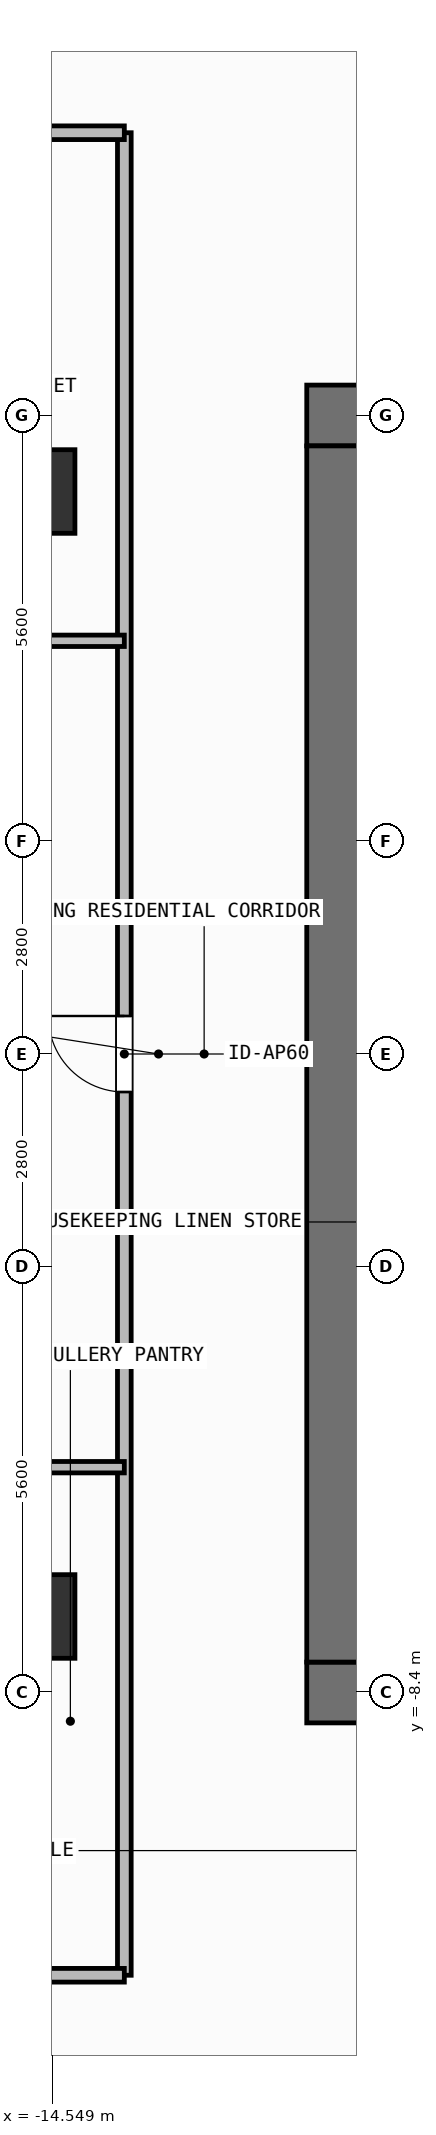
"""IFC4 building model, lengths in metres.
Left out: names, types, materials, properties, quantities, classifications, styles, units other than length and angle.
Written with IfcOpenShell. Run it as: python <this file> out.ifc"""

import sys

from ifc_helpers import new_model, si_unit, direction, frame, frame_2d, origin, origin_2d, place, context, subcontext, project, spatial, rectangle, extrude, element, fill, save


model = new_model("IFC4")
c1 = context("Model", 3, precision=1e-05, world=origin(), true_north=direction((0.0, 1.0)))
c2 = subcontext(c1, "Body", "Model", "MODEL_VIEW")
j1 = project(units=[si_unit("LENGTHUNIT", "METRE"), si_unit("PLANEANGLEUNIT", "RADIAN")], contexts=[c1])
p1 = place(None, origin())
s1 = spatial("IfcSite", under=j1, at=p1, CompositionType="ELEMENT")
p2 = place(p1, origin())
s2 = spatial("IfcBuilding", under=s1, at=p2, CompositionType="ELEMENT")
p3 = place(p2, frame((0.0, 0.0, 168.0)))
s3 = spatial("IfcBuildingStorey", under=s2, at=p3, CompositionType="ELEMENT", Elevation=168.0)
for number, where, z_axis, x_axis in (
    (1, (-11.2, -8.4, 0.0), (0.0, 0.0, 1.0), (1.0, 0.0, 0.0)),
    (2, (-11.2, 8.4, 0.0), (0.0, 0.0, 1.0), (1.0, 0.0, 0.0)),
):
    element("IfcWall", number, at=place(p3, frame(where, z_axis=z_axis, x_axis=x_axis)), inside=s3, PredefinedType="SHEAR", context=c2, shape_type="SweptSolid", body=[
        extrude(rectangle(XDim=1.5, YDim=0.8, at=frame_2d((0.75, 0.0))), origin(), (0.0, 0.0, 1.0), 3.9),
    ])
p4 = place(p3, frame((-10.8, -8.0, 0.0), z_axis=(0.0, 0.0, 1.0), x_axis=(0.0, 1.0, 0.0)))
e3 = element("IfcWall", 3, at=p4, inside=s3, PredefinedType="SHEAR", context=c2, shape_type="SweptSolid", body=[
    extrude(rectangle(XDim=16.0, YDim=0.8, at=frame_2d((8.0, 0.0))), origin(), (0.0, 0.0, 1.0), 3.9),
])
for number, where, z_axis, x_axis in (
    (4, (-14.8, -7.4, 0.0), (0.0, 0.0, 1.0), (1.0, 0.0, 0.0)),
    (5, (-14.8, 7.4, 0.0), (0.0, 0.0, 1.0), (1.0, 0.0, 0.0)),
):
    element("IfcColumn", number, at=place(p3, frame(where, z_axis=z_axis, x_axis=x_axis)), inside=s3, PredefinedType="COLUMN", context=c2, shape_type="SweptSolid", body=[
        extrude(rectangle(XDim=1.1, YDim=1.1, at=origin_2d()), origin(), (0.0, 0.0, 1.0), 3.9),
    ])
p5 = place(p3, frame((-13.6, -12.12, 0.0), z_axis=(0.0, 0.0, 1.0), x_axis=(0.0, 1.0, 0.0)))
e6 = element("IfcWall", 6, at=p5, inside=s3, PredefinedType="PARTITIONING", context=c2, shape_type="SweptSolid", body=[
    extrude(rectangle(XDim=24.24, YDim=0.18, at=frame_2d((12.12, 0.0))), origin(), (0.0, 0.0, 1.0), 3.68),
])
p6 = place(p5, frame((11.62, 0.0, 0.0)))
e7 = element("IfcOpeningElement", 7, at=p6, cuts=e6, PredefinedType="OPENING", context=c2, shape_type="SweptSolid", body=[
    extrude(rectangle(XDim=1.0, YDim=2.2, at=frame_2d((0.5, 1.1))), frame((0.0, 0.1, 0.0), z_axis=(0.0, -1.0, 0.0), x_axis=(1.0, 0.0, 0.0)), (0.0, 0.0, 1.0), 0.2),
])
p7 = place(p3, frame((-18.223, 5.436, 0.0), z_axis=(0.0, 0.0, 1.0), x_axis=(1.0, 0.0, 0.0)))
e8 = element("IfcWall", 8, at=p7, inside=s3, PredefinedType="PARTITIONING", context=c2, shape_type="SweptSolid", body=[
    extrude(rectangle(XDim=4.623, YDim=0.15, at=frame_2d((2.312, 0.0))), origin(), (0.0, 0.0, 1.0), 3.68),
])
p8 = place(p7, frame((1.886, 0.0, 0.0)))
e9 = element("IfcOpeningElement", 9, at=p8, cuts=e8, PredefinedType="OPENING", context=c2, shape_type="SweptSolid", body=[
    extrude(rectangle(XDim=0.85, YDim=2.1, at=frame_2d((0.425, 1.05))), frame((0.0, 0.085, 0.0), z_axis=(0.0, -1.0, 0.0), x_axis=(1.0, 0.0, 0.0)), (0.0, 0.0, 1.0), 0.17),
])
p9 = place(p3, frame((-21.29, -5.436, 0.0), z_axis=(0.0, 0.0, 1.0), x_axis=(1.0, 0.0, 0.0)))
e10 = element("IfcWall", 10, at=p9, inside=s3, PredefinedType="PARTITIONING", context=c2, shape_type="SweptSolid", body=[
    extrude(rectangle(XDim=7.69, YDim=0.15, at=frame_2d((3.845, 0.0))), origin(), (0.0, 0.0, 1.0), 3.68),
])
p10 = place(p9, frame((3.332, 0.0, 0.0)))
e11 = element("IfcOpeningElement", 11, at=p10, cuts=e10, PredefinedType="OPENING", context=c2, shape_type="SweptSolid", body=[
    extrude(rectangle(XDim=0.85, YDim=2.1, at=frame_2d((0.425, 1.05))), frame((0.0, 0.085, 0.0), z_axis=(0.0, -1.0, 0.0), x_axis=(1.0, 0.0, 0.0)), (0.0, 0.0, 1.0), 0.17),
])
for number, where, z_axis, x_axis in (
    (12, (-25.53, -12.12, 0.0), (0.0, 0.0, 1.0), (1.0, 0.0, 0.0)),
    (13, (-25.53, 12.12, 0.0), (0.0, 0.0, 1.0), (1.0, 0.0, 0.0)),
):
    element("IfcWall", number, at=place(p3, frame(where, z_axis=z_axis, x_axis=x_axis)), inside=s3, PredefinedType="PARTITIONING", context=c2, shape_type="SweptSolid", body=[
        extrude(rectangle(XDim=11.93, YDim=0.18, at=frame_2d((5.965, 0.0))), origin(), (0.0, 0.0, 1.0), 3.68),
    ])
p11 = place(p6, origin())
e14 = element("IfcDoor", 14, at=p11, inside=s3, OperationType="SINGLE_SWING_RIGHT", PredefinedType="DOOR", context=c2, shape_type="SweptSolid", body=[
    extrude(rectangle(XDim=1.0, YDim=2.2, at=frame_2d((0.5, 1.1))), frame((0.0, 0.025, 0.0), z_axis=(0.0, -1.0, 0.0), x_axis=(1.0, 0.0, 0.0)), (0.0, 0.0, 1.0), 0.05),
])
fill(e7, e14)
save(model, sys.argv[1])
